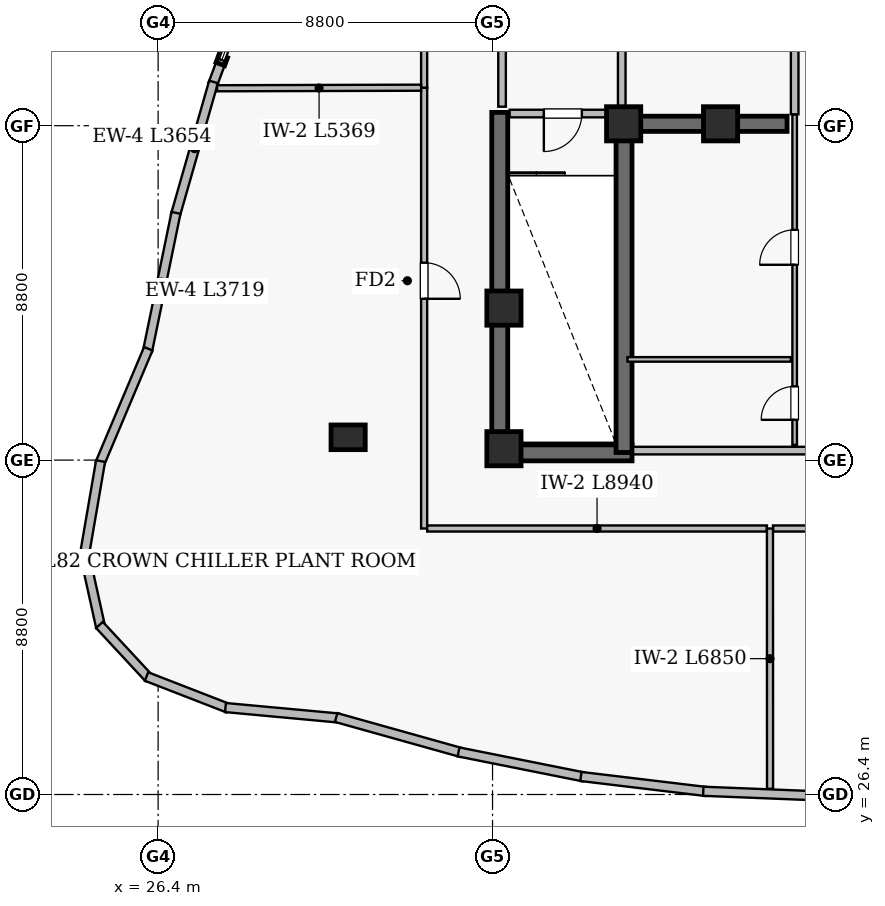
"""IFC4 building model, lengths in metres.
Left out: names, types, materials, properties, quantities, classifications, styles, units other than length and angle.
Written with IfcOpenShell. Run it as: python <this file> out.ifc"""

import sys

from ifc_helpers import new_model, si_unit, direction, frame, frame_2d, origin, origin_2d, place, context, subcontext, project, spatial, rectangle, extrude, element, fill, save


model = new_model("IFC4")
c1 = context("Model", 3, precision=1e-05, world=origin(), true_north=direction((0.0, 1.0)))
c2 = subcontext(c1, "Body", "Model", "MODEL_VIEW")
j1 = project(units=[si_unit("LENGTHUNIT", "METRE"), si_unit("PLANEANGLEUNIT", "RADIAN")], contexts=[c1])
p1 = place(None, origin())
s1 = spatial("IfcSite", under=j1, at=p1, CompositionType="ELEMENT")
p2 = place(p1, origin())
s2 = spatial("IfcBuilding", under=s1, at=p2, CompositionType="ELEMENT")
p3 = place(p2, frame((0.0, 0.0, 312.8)))
s3 = spatial("IfcBuildingStorey", under=s2, at=p3, CompositionType="ELEMENT", Elevation=312.8)
p4 = place(p3, frame((35.18, 35.39, 0.0), z_axis=(0.0, 0.0, 1.0), x_axis=(1.0, 0.0, 0.0)))
e1 = element("IfcWall", 1, at=p4, inside=s3, PredefinedType="SHEAR", context=c2, shape_type="SweptSolid", body=[
    extrude(rectangle(XDim=3.69, YDim=0.42, at=frame_2d((1.845, 0.0))), origin(), (0.0, 0.0, 1.0), 4.99),
])
p5 = place(p3, frame((35.39, 35.18, 0.0), z_axis=(0.0, 0.0, 1.0), x_axis=(0.0, 1.0, 0.0)))
e2 = element("IfcWall", 2, at=p5, inside=s3, PredefinedType="SHEAR", context=c2, shape_type="SweptSolid", body=[
    extrude(rectangle(XDim=9.17, YDim=0.42, at=frame_2d((4.585, 0.0))), origin(), (0.0, 0.0, 1.0), 4.99),
])
p6 = place(p3, frame((38.66, 35.4, 0.0), z_axis=(0.0, 0.0, 1.0), x_axis=(0.0, 1.0, 0.0)))
e3 = element("IfcWall", 3, at=p6, inside=s3, PredefinedType="SHEAR", context=c2, shape_type="SweptSolid", body=[
    extrude(rectangle(XDim=8.95, YDim=0.42, at=frame_2d((4.475, 0.0))), origin(), (0.0, 0.0, 1.0), 4.99),
])
p7 = place(p3, frame((38.75, 44.05, 0.0), z_axis=(0.0, 0.0, 1.0), x_axis=(1.0, 0.0, 0.0)))
e4 = element("IfcWall", 4, at=p7, inside=s3, PredefinedType="SHEAR", context=c2, shape_type="SweptSolid", body=[
    extrude(rectangle(XDim=4.2, YDim=0.4, at=frame_2d((2.1, 0.0))), origin(), (0.0, 0.0, 1.0), 4.99),
])
for number, where, z_axis, x_axis in (
    (5, (35.5, 35.5, 0.0), (0.0, 0.0, 1.0), (1.0, 0.0, 0.0)),
    (6, (38.65, 44.05, 0.0), (0.0, 0.0, 1.0), (1.0, 0.0, 0.0)),
    (7, (35.5, 39.2, 0.0), (0.0, 0.0, 1.0), (1.0, 0.0, 0.0)),
    (8, (41.2, 44.05, 0.0), (0.0, 0.0, 1.0), (1.0, 0.0, 0.0)),
):
    element("IfcColumn", number, at=place(p3, frame(where, z_axis=z_axis, x_axis=x_axis)), inside=s3, PredefinedType="COLUMN", context=c2, shape_type="SweptSolid", body=[
        extrude(rectangle(XDim=0.9, YDim=0.9, at=origin_2d()), origin(), (0.0, 0.0, 1.0), 5.2),
    ])
p8 = place(p3, frame((31.4, 35.8, 0.0), z_axis=(0.0, 0.0, 1.0), x_axis=(1.0, 0.0, 0.0)))
e9 = element("IfcColumn", 9, at=p8, inside=s3, PredefinedType="COLUMN", context=c2, shape_type="SweptSolid", body=[
    extrude(rectangle(XDim=0.9, YDim=0.65, at=origin_2d()), origin(), (0.0, 0.0, 1.0), 5.2),
])
p9 = place(p3, frame((28.083, 45.746, 0.0), z_axis=(0.0, 0.0, 1.0), x_axis=(-0.348960000238, -0.937137619688, 0.0)))
e10 = element("IfcWall", 10, at=p9, inside=s3, PredefinedType="SOLIDWALL", context=c2, shape_type="SweptSolid", body=[
    extrude(rectangle(XDim=0.705, YDim=0.24, at=frame_2d((0.353, 0.0))), origin(), (0.0, 0.0, 1.0), 4.99),
])
p10 = place(p3, frame((27.858, 45.152, 0.0), z_axis=(0.0, 0.0, 1.0), x_axis=(-0.274897629025, -0.961473501224, 0.0)))
e11 = element("IfcWall", 11, at=p10, inside=s3, PredefinedType="SOLIDWALL", context=c2, shape_type="SweptSolid", body=[
    extrude(rectangle(XDim=3.654, YDim=0.24, at=frame_2d((1.827, 0.0))), origin(), (0.0, 0.0, 1.0), 4.99),
])
p11 = place(p3, frame((26.871, 41.707, 0.0), z_axis=(0.0, 0.0, 1.0), x_axis=(-0.201578837363, -0.979472292782, 0.0)))
e12 = element("IfcWall", 12, at=p11, inside=s3, PredefinedType="SOLIDWALL", context=c2, shape_type="SweptSolid", body=[
    extrude(rectangle(XDim=3.719, YDim=0.24, at=frame_2d((1.86, 0.0))), origin(), (0.0, 0.0, 1.0), 4.99),
])
p12 = place(p3, frame((26.142, 38.13, 0.0), z_axis=(0.0, 0.0, 1.0), x_axis=(-0.388622520849, -0.921397056805, 0.0)))
e13 = element("IfcWall", 13, at=p12, inside=s3, PredefinedType="SOLIDWALL", context=c2, shape_type="SweptSolid", body=[
    extrude(rectangle(XDim=3.281, YDim=0.24, at=frame_2d((1.64, 0.0))), origin(), (0.0, 0.0, 1.0), 4.99),
])
p13 = place(p3, frame((24.886, 35.174, 0.0), z_axis=(0.0, 0.0, 1.0), x_axis=(-0.169240125324, -0.985574847477, 0.0)))
e14 = element("IfcWall", 14, at=p13, inside=s3, PredefinedType="SOLIDWALL", context=c2, shape_type="SweptSolid", body=[
    extrude(rectangle(XDim=2.526, YDim=0.24, at=frame_2d((1.263, 0.0))), origin(), (0.0, 0.0, 1.0), 4.99),
])
p14 = place(p3, frame((24.457, 32.753, 0.0), z_axis=(0.0, 0.0, 1.0), x_axis=(0.215649526387, -0.976470829963, 0.0)))
e15 = element("IfcWall", 15, at=p14, inside=s3, PredefinedType="SOLIDWALL", context=c2, shape_type="SweptSolid", body=[
    extrude(rectangle(XDim=1.998, YDim=0.24, at=frame_2d((0.999, 0.0))), origin(), (0.0, 0.0, 1.0), 4.99),
])
p15 = place(p3, frame((24.856, 30.862, 0.0), z_axis=(0.0, 0.0, 1.0), x_axis=(0.680072395428, -0.733144963139, 0.0)))
e16 = element("IfcWall", 16, at=p15, inside=s3, PredefinedType="SOLIDWALL", context=c2, shape_type="SweptSolid", body=[
    extrude(rectangle(XDim=1.905, YDim=0.24, at=frame_2d((0.952, 0.0))), origin(), (0.0, 0.0, 1.0), 4.99),
])
p16 = place(p3, frame((26.095, 29.504, 0.0), z_axis=(0.0, 0.0, 1.0), x_axis=(0.932269297358, -0.361765058019, 0.0)))
e17 = element("IfcWall", 17, at=p16, inside=s3, PredefinedType="SOLIDWALL", context=c2, shape_type="SweptSolid", body=[
    extrude(rectangle(XDim=2.301, YDim=0.24, at=frame_2d((1.15, 0.0))), origin(), (0.0, 0.0, 1.0), 4.99),
])
p17 = place(p3, frame((28.173, 28.688, 0.0), z_axis=(0.0, 0.0, 1.0), x_axis=(0.995767942029, -0.091903240575, 0.0)))
e18 = element("IfcWall", 18, at=p17, inside=s3, PredefinedType="SOLIDWALL", context=c2, shape_type="SweptSolid", body=[
    extrude(rectangle(XDim=2.994, YDim=0.24, at=frame_2d((1.497, 0.0))), origin(), (0.0, 0.0, 1.0), 4.99),
])
p18 = place(p3, frame((31.085, 28.425, 0.0), z_axis=(0.0, 0.0, 1.0), x_axis=(0.962972931592, -0.269598095359, 0.0)))
e19 = element("IfcWall", 19, at=p18, inside=s3, PredefinedType="SOLIDWALL", context=c2, shape_type="SweptSolid", body=[
    extrude(rectangle(XDim=3.414, YDim=0.24, at=frame_2d((1.707, 0.0))), origin(), (0.0, 0.0, 1.0), 4.99),
])
p19 = place(p3, frame((34.305, 27.521, 0.0), z_axis=(0.0, 0.0, 1.0), x_axis=(0.980569475455, -0.196172128005, 0.0)))
e20 = element("IfcWall", 20, at=p19, inside=s3, PredefinedType="SOLIDWALL", context=c2, shape_type="SweptSolid", body=[
    extrude(rectangle(XDim=3.354, YDim=0.24, at=frame_2d((1.677, 0.0))), origin(), (0.0, 0.0, 1.0), 4.99),
])
p20 = place(p3, frame((37.525, 26.875, 0.0), z_axis=(0.0, 0.0, 1.0), x_axis=(0.992868119477, -0.119217856572, 0.0)))
e21 = element("IfcWall", 21, at=p20, inside=s3, PredefinedType="SOLIDWALL", context=c2, shape_type="SweptSolid", body=[
    extrude(rectangle(XDim=3.313, YDim=0.24, at=frame_2d((1.657, 0.0))), origin(), (0.0, 0.0, 1.0), 4.99),
])
p21 = place(p3, frame((40.745, 26.485, 0.0), z_axis=(0.0, 0.0, 1.0), x_axis=(0.999201195577, -0.039962116526, 0.0)))
e22 = element("IfcWall", 22, at=p21, inside=s3, PredefinedType="SOLIDWALL", context=c2, shape_type="SweptSolid", body=[
    extrude(rectangle(XDim=3.293, YDim=0.24, at=frame_2d((1.646, 0.0))), origin(), (0.0, 0.0, 1.0), 4.99),
])
p22 = place(p3, frame((42.58, 33.4, 0.0), z_axis=(0.0, 0.0, 1.0), x_axis=(1.0, 0.0, 0.0)))
e23 = element("IfcWall", 23, at=p22, inside=s3, PredefinedType="SOLIDWALL", context=c2, shape_type="SweptSolid", body=[
    extrude(rectangle(XDim=11.94, YDim=0.16, at=frame_2d((5.97, 0.0))), origin(), (0.0, 0.0, 1.0), 4.178),
])
p23 = place(p22, frame((5.495, 0.0, 0.0)))
e24 = element("IfcOpeningElement", 24, at=p23, cuts=e23, PredefinedType="OPENING", context=c2, shape_type="SweptSolid", body=[
    extrude(rectangle(XDim=0.95, YDim=2.15, at=frame_2d((0.475, 1.075))), frame((0.0, 0.09, 0.0), z_axis=(0.0, -1.0, 0.0), x_axis=(1.0, 0.0, 0.0)), (0.0, 0.0, 1.0), 0.18),
])
p24 = place(p3, frame((33.4, 45.0, 0.0), z_axis=(0.0, 0.0, 1.0), x_axis=(0.0, -1.0, 0.0)))
e25 = element("IfcWall", 25, at=p24, inside=s3, PredefinedType="SOLIDWALL", context=c2, shape_type="SweptSolid", body=[
    extrude(rectangle(XDim=11.6, YDim=0.16, at=frame_2d((5.8, 0.0))), origin(), (0.0, 0.0, 1.0), 4.178),
])
p25 = place(p24, frame((4.605, 0.0, 0.0)))
e26 = element("IfcOpeningElement", 26, at=p25, cuts=e25, PredefinedType="OPENING", context=c2, shape_type="SweptSolid", body=[
    extrude(rectangle(XDim=0.95, YDim=2.15, at=frame_2d((0.475, 1.075))), frame((0.0, 0.09, 0.0), z_axis=(0.0, -1.0, 0.0), x_axis=(1.0, 0.0, 0.0)), (0.0, 0.0, 1.0), 0.18),
])
p26 = place(p3, frame((38.9, 35.45, 0.0), z_axis=(0.0, 0.0, 1.0), x_axis=(1.0, 0.0, 0.0)))
e27 = element("IfcWall", 27, at=p26, inside=s3, PredefinedType="SOLIDWALL", context=c2, shape_type="SweptSolid", body=[
    extrude(rectangle(XDim=10.2, YDim=0.2, at=frame_2d((5.1, 0.0))), origin(), (0.0, 0.0, 1.0), 4.99),
])
p27 = place(p26, frame((4.6, 0.0, 0.0)))
e28 = element("IfcOpeningElement", 28, at=p27, cuts=e27, PredefinedType="OPENING", context=c2, shape_type="SweptSolid", body=[
    extrude(rectangle(XDim=1.0, YDim=2.15, at=frame_2d((0.5, 1.075))), frame((0.0, 0.11, 0.0), z_axis=(0.0, -1.0, 0.0), x_axis=(1.0, 0.0, 0.0)), (0.0, 0.0, 1.0), 0.22),
])
p28 = place(p3, frame((43.15, 35.6, 0.0), z_axis=(0.0, 0.0, 1.0), x_axis=(0.0, 1.0, 0.0)))
e29 = element("IfcWall", 29, at=p28, inside=s3, PredefinedType="PARTITIONING", context=c2, shape_type="SweptSolid", body=[
    extrude(rectangle(XDim=8.7, YDim=0.12, at=frame_2d((4.35, 0.0))), origin(), (0.0, 0.0, 1.0), 4.99),
])
p29 = place(p28, frame((0.66, 0.0, 0.0)))
e30 = element("IfcOpeningElement", 30, at=p29, cuts=e29, PredefinedType="OPENING", context=c2, shape_type="SweptSolid", body=[
    extrude(rectangle(XDim=0.88, YDim=2.1, at=frame_2d((0.44, 1.05))), frame((0.0, 0.07, 0.0), z_axis=(0.0, -1.0, 0.0), x_axis=(1.0, 0.0, 0.0)), (0.0, 0.0, 1.0), 0.14),
])
p30 = place(p28, frame((4.74, 0.0, 0.0)))
e31 = element("IfcOpeningElement", 31, at=p30, cuts=e29, PredefinedType="OPENING", context=c2, shape_type="SweptSolid", body=[
    extrude(rectangle(XDim=0.92, YDim=2.1, at=frame_2d((0.46, 1.05))), frame((0.0, 0.07, 0.0), z_axis=(0.0, -1.0, 0.0), x_axis=(1.0, 0.0, 0.0)), (0.0, 0.0, 1.0), 0.14),
])
p31 = place(p3, frame((35.45, 44.5, 0.0), z_axis=(0.0, 0.0, 1.0), x_axis=(0.0, 1.0, 0.0)))
e32 = element("IfcWall", 32, at=p31, inside=s3, PredefinedType="SOLIDWALL", context=c2, shape_type="SweptSolid", body=[
    extrude(rectangle(XDim=7.92, YDim=0.2, at=frame_2d((3.96, 0.0))), origin(), (0.0, 0.0, 1.0), 4.99),
])
p32 = place(p31, frame((2.6, 0.0, 0.0)))
e33 = element("IfcOpeningElement", 33, at=p32, cuts=e32, PredefinedType="OPENING", context=c2, shape_type="SweptSolid", body=[
    extrude(rectangle(XDim=1.0, YDim=2.15, at=frame_2d((0.5, 1.075))), frame((0.0, 0.11, 0.0), z_axis=(0.0, -1.0, 0.0), x_axis=(1.0, 0.0, 0.0)), (0.0, 0.0, 1.0), 0.22),
])
p33 = place(p3, frame((38.6, 44.5, 0.0), z_axis=(0.0, 0.0, 1.0), x_axis=(0.0, 1.0, 0.0)))
e34 = element("IfcWall", 34, at=p33, inside=s3, PredefinedType="SOLIDWALL", context=c2, shape_type="SweptSolid", body=[
    extrude(rectangle(XDim=7.92, YDim=0.2, at=frame_2d((3.96, 0.0))), origin(), (0.0, 0.0, 1.0), 4.99),
])
p34 = place(p33, frame((3.425, 0.0, 0.0)))
e35 = element("IfcOpeningElement", 35, at=p34, cuts=e34, PredefinedType="OPENING", context=c2, shape_type="SweptSolid", body=[
    extrude(rectangle(XDim=0.95, YDim=2.15, at=frame_2d((0.475, 1.075))), frame((0.0, 0.11, 0.0), z_axis=(0.0, -1.0, 0.0), x_axis=(1.0, 0.0, 0.0)), (0.0, 0.0, 1.0), 0.22),
])
p35 = place(p3, frame((35.65, 44.32, 0.0), z_axis=(0.0, 0.0, 1.0), x_axis=(1.0, 0.0, 0.0)))
e36 = element("IfcWall", 36, at=p35, inside=s3, PredefinedType="SOLIDWALL", context=c2, shape_type="SweptSolid", body=[
    extrude(rectangle(XDim=2.8, YDim=0.2, at=frame_2d((1.4, 0.0))), origin(), (0.0, 0.0, 1.0), 4.99),
])
p36 = place(p35, frame((0.9, 0.0, 0.0)))
e37 = element("IfcOpeningElement", 37, at=p36, cuts=e36, PredefinedType="OPENING", context=c2, shape_type="SweptSolid", body=[
    extrude(rectangle(XDim=1.0, YDim=2.15, at=frame_2d((0.5, 1.075))), frame((0.0, 0.11, 0.0), z_axis=(0.0, -1.0, 0.0), x_axis=(1.0, 0.0, 0.0)), (0.0, 0.0, 1.0), 0.22),
])
p37 = place(p3, frame((33.4, 54.6, 0.0), z_axis=(0.0, 0.0, 1.0), x_axis=(0.0, -1.0, 0.0)))
e38 = element("IfcWall", 38, at=p37, inside=s3, PredefinedType="SOLIDWALL", context=c2, shape_type="SweptSolid", body=[
    extrude(rectangle(XDim=9.6, YDim=0.16, at=frame_2d((4.8, 0.0))), origin(), (0.0, 0.0, 1.0), 4.178),
])
p38 = place(p3, frame((33.48, 33.4, 0.0), z_axis=(0.0, 0.0, 1.0), x_axis=(1.0, 0.0, 0.0)))
e39 = element("IfcWall", 39, at=p38, inside=s3, PredefinedType="SOLIDWALL", context=c2, shape_type="SweptSolid", body=[
    extrude(rectangle(XDim=8.94, YDim=0.16, at=frame_2d((4.47, 0.0))), origin(), (0.0, 0.0, 1.0), 4.178),
])
p39 = place(p3, frame((42.502, 26.55, 0.0), z_axis=(0.0, 0.0, 1.0), x_axis=(-0.000285133823, 0.999999959349, 0.0)))
e40 = element("IfcWall", 40, at=p39, inside=s3, PredefinedType="SOLIDWALL", context=c2, shape_type="SweptSolid", body=[
    extrude(rectangle(XDim=6.85, YDim=0.16, at=frame_2d((3.425, 0.0))), origin(), (0.0, 0.0, 1.0), 4.178),
])
p40 = place(p3, frame((33.32, 45.0, 0.0), z_axis=(0.0, 0.0, 1.0), x_axis=(-0.999996153217, -0.002773725234, 0.0)))
e41 = element("IfcWall", 41, at=p40, inside=s3, PredefinedType="SOLIDWALL", context=c2, shape_type="SweptSolid", body=[
    extrude(rectangle(XDim=5.369, YDim=0.16, at=frame_2d((2.685, 0.0))), origin(), (0.0, 0.0, 1.0), 4.178),
])
p41 = place(p3, frame((38.75, 37.85, 0.0), z_axis=(0.0, 0.0, 1.0), x_axis=(1.0, 0.0, 0.0)))
e42 = element("IfcWall", 42, at=p41, inside=s3, PredefinedType="PARTITIONING", context=c2, shape_type="SweptSolid", body=[
    extrude(rectangle(XDim=4.3, YDim=0.12, at=frame_2d((2.15, 0.0))), origin(), (0.0, 0.0, 1.0), 4.99),
])
p42 = place(p3, frame((43.15, 44.3, 0.0), z_axis=(0.0, 0.0, 1.0), x_axis=(0.0, 1.0, 0.0)))
e43 = element("IfcWall", 43, at=p42, inside=s3, PredefinedType="SOLIDWALL", context=c2, shape_type="SweptSolid", body=[
    extrude(rectangle(XDim=2.58, YDim=0.2, at=frame_2d((1.29, 0.0))), origin(), (0.0, 0.0, 1.0), 4.99),
])
p43 = place(p36, frame((1.0, 0.0, 0.0), z_axis=(0.0, 0.0, 1.0), x_axis=(-1.0, 0.0, 0.0)))
e44 = element("IfcDoor", 44, at=p43, inside=s3, OperationType="SINGLE_SWING_LEFT", PredefinedType="DOOR", context=c2, shape_type="SweptSolid", body=[
    extrude(rectangle(XDim=1.0, YDim=2.15, at=frame_2d((0.5, 1.075))), frame((0.0, 0.025, 0.0), z_axis=(0.0, -1.0, 0.0), x_axis=(1.0, 0.0, 0.0)), (0.0, 0.0, 1.0), 0.05),
])
fill(e37, e44)
p44 = place(p29, origin())
e45 = element("IfcDoor", 45, at=p44, inside=s3, OperationType="SINGLE_SWING_LEFT", PredefinedType="DOOR", context=c2, shape_type="SweptSolid", body=[
    extrude(rectangle(XDim=0.88, YDim=2.1, at=frame_2d((0.44, 1.05))), frame((0.0, 0.025, 0.0), z_axis=(0.0, -1.0, 0.0), x_axis=(1.0, 0.0, 0.0)), (0.0, 0.0, 1.0), 0.05),
])
fill(e30, e45)
p45 = place(p30, origin())
e46 = element("IfcDoor", 46, at=p45, inside=s3, OperationType="SINGLE_SWING_LEFT", PredefinedType="DOOR", context=c2, shape_type="SweptSolid", body=[
    extrude(rectangle(XDim=0.92, YDim=2.1, at=frame_2d((0.46, 1.05))), frame((0.0, 0.025, 0.0), z_axis=(0.0, -1.0, 0.0), x_axis=(1.0, 0.0, 0.0)), (0.0, 0.0, 1.0), 0.05),
])
fill(e31, e46)
p46 = place(p25, origin())
e47 = element("IfcDoor", 47, at=p46, inside=s3, OperationType="SINGLE_SWING_RIGHT", PredefinedType="DOOR", context=c2, shape_type="SweptSolid", body=[
    extrude(rectangle(XDim=0.95, YDim=2.15, at=frame_2d((0.475, 1.075))), frame((0.0, 0.025, 0.0), z_axis=(0.0, -1.0, 0.0), x_axis=(1.0, 0.0, 0.0)), (0.0, 0.0, 1.0), 0.05),
])
fill(e26, e47)
save(model, sys.argv[1])
